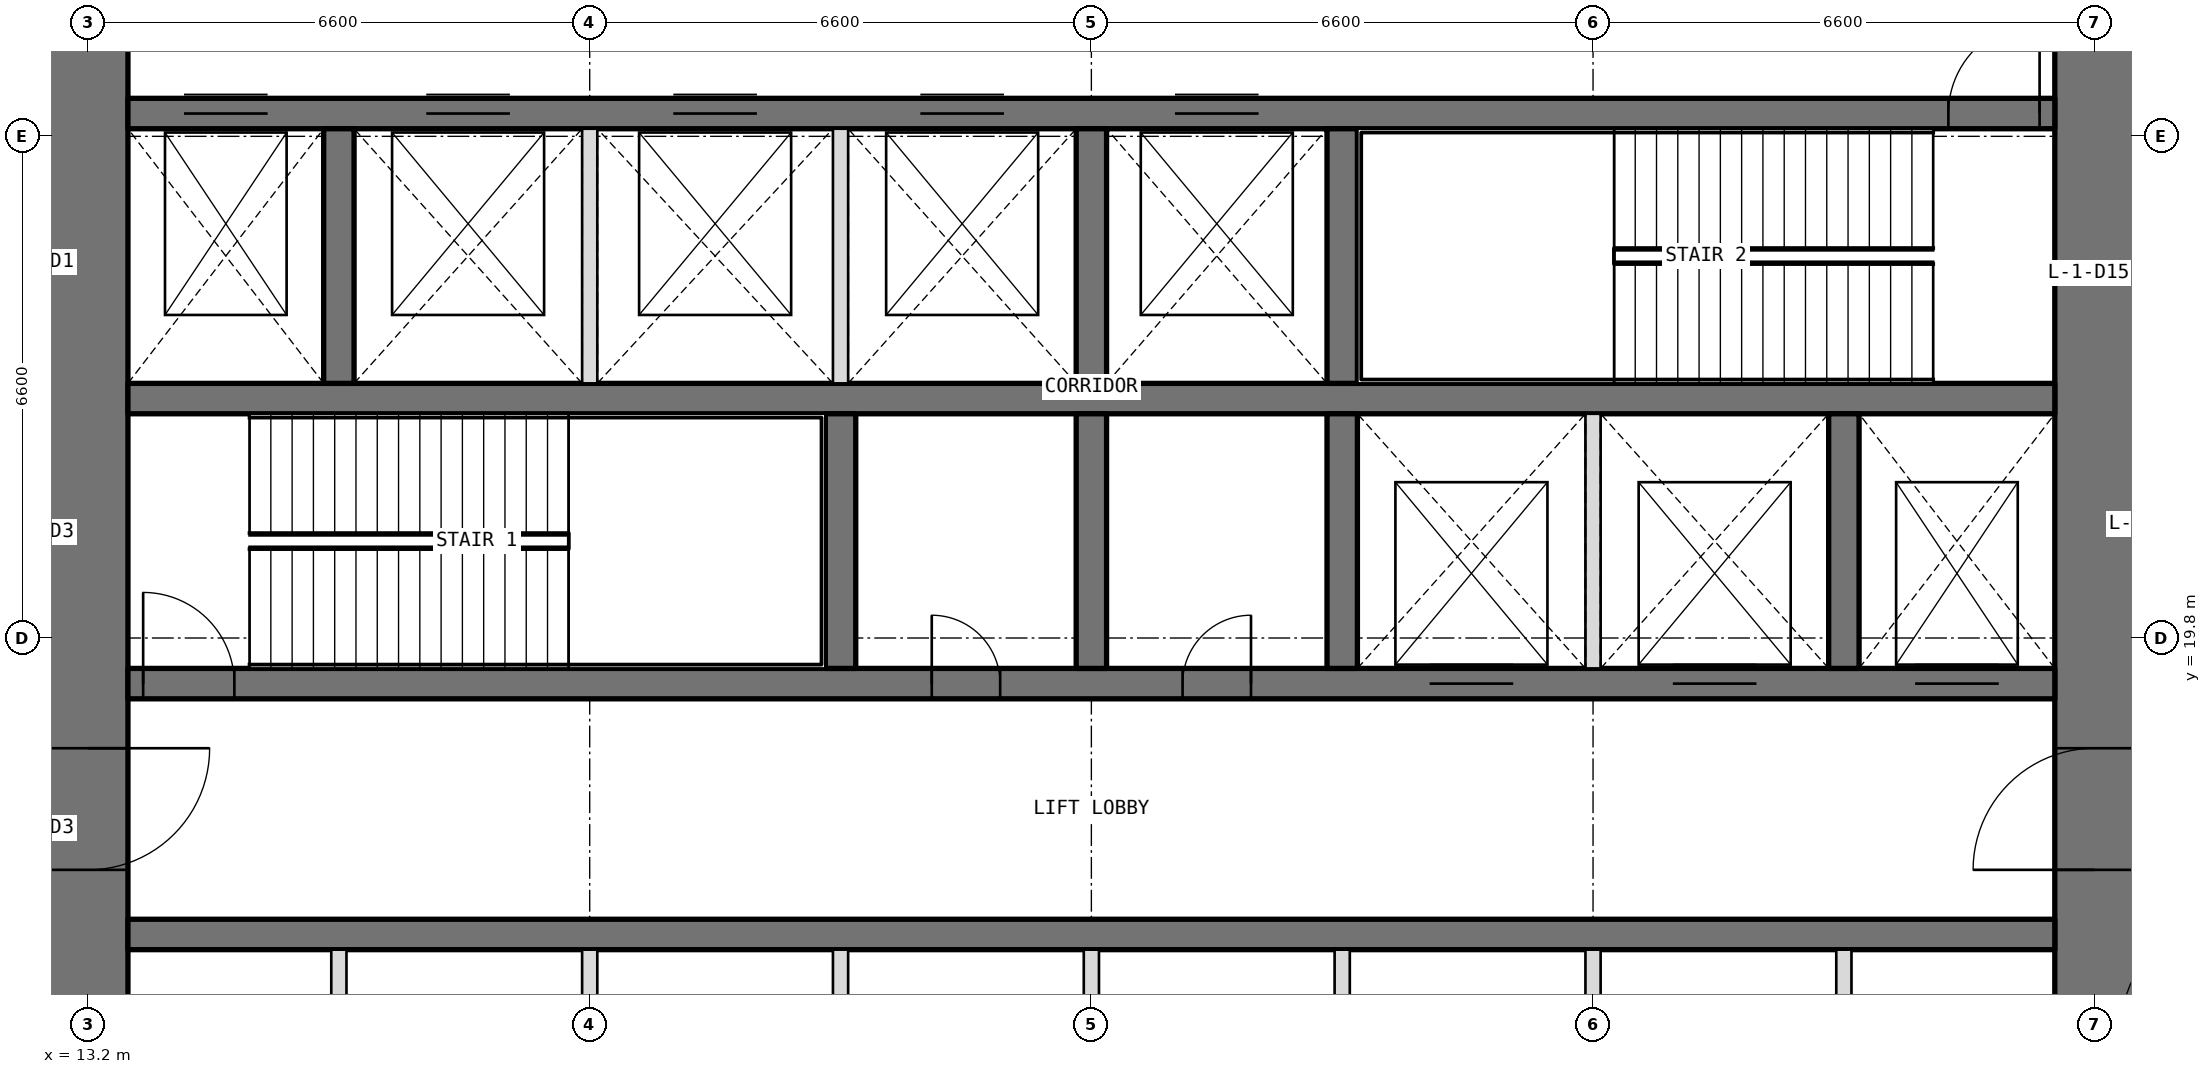
"""IFC4 building model, lengths in metres.
Left out: names, types, materials, properties, quantities, classifications, styles, units other than length and angle.
Written with IfcOpenShell. Run it as: python <this file> out.ifc"""

import sys

from ifc_helpers import new_model, si_unit, direction, frame, frame_2d, origin, place, context, subcontext, project, spatial, rectangle, extrude, element, fill, save


model = new_model("IFC4")
c1 = context("Model", 3, precision=1e-05, world=origin(), true_north=direction((0.0, 1.0)))
c2 = subcontext(c1, "Body", "Model", "MODEL_VIEW")
j1 = project(units=[si_unit("LENGTHUNIT", "METRE"), si_unit("PLANEANGLEUNIT", "RADIAN")], contexts=[c1])
p1 = place(None, origin())
s1 = spatial("IfcSite", under=j1, at=p1, CompositionType="ELEMENT")
p2 = place(p1, origin())
s2 = spatial("IfcBuilding", under=s1, at=p2, CompositionType="ELEMENT")
p3 = place(p2, frame((0.0, 0.0, -5.4)))
s3 = spatial("IfcBuildingStorey", under=s2, at=p3, CompositionType="ELEMENT", Elevation=-5.4)
p4 = place(p3, frame((39.6, 13.725, -0.15), z_axis=(0.0, 0.0, 1.0), x_axis=(0.0, 1.0, 0.0)))
e1 = element("IfcWall", 1, at=p4, inside=s3, PredefinedType="SHEAR", context=c2, shape_type="SweptSolid", body=[
    extrude(rectangle(XDim=18.75, YDim=1.05, at=frame_2d((9.375, 0.0))), origin(), (0.0, 0.0, 1.0), 5.55),
])
p5 = place(p4, frame((3.025, 0.0, 0.15)))
e2 = element("IfcOpeningElement", 2, at=p5, cuts=e1, PredefinedType="OPENING", context=c2, shape_type="SweptSolid", body=[
    extrude(rectangle(XDim=1.6, YDim=2.1, at=frame_2d((0.8, 1.05))), frame((0.0, 0.535, 0.0), z_axis=(0.0, -1.0, 0.0), x_axis=(1.0, 0.0, 0.0)), (0.0, 0.0, 1.0), 1.07),
])
p6 = place(p4, frame((13.825, 0.0, 0.15)))
e3 = element("IfcOpeningElement", 3, at=p6, cuts=e1, PredefinedType="OPENING", context=c2, shape_type="SweptSolid", body=[
    extrude(rectangle(XDim=1.6, YDim=2.1, at=frame_2d((0.8, 1.05))), frame((0.0, 0.535, 0.0), z_axis=(0.0, -1.0, 0.0), x_axis=(1.0, 0.0, 0.0)), (0.0, 0.0, 1.0), 1.07),
])
p7 = place(p3, frame((13.2, 32.475, -0.15), z_axis=(0.0, 0.0, 1.0), x_axis=(0.0, -1.0, 0.0)))
e4 = element("IfcWall", 4, at=p7, inside=s3, PredefinedType="SHEAR", context=c2, shape_type="SweptSolid", body=[
    extrude(rectangle(XDim=18.75, YDim=1.05, at=frame_2d((9.375, 0.0))), origin(), (0.0, 0.0, 1.0), 5.55),
])
p8 = place(p7, frame((14.125, 0.0, 0.15)))
e5 = element("IfcOpeningElement", 5, at=p8, cuts=e4, PredefinedType="OPENING", context=c2, shape_type="SweptSolid", body=[
    extrude(rectangle(XDim=1.6, YDim=2.1, at=frame_2d((0.8, 1.05))), frame((0.0, 0.535, 0.0), z_axis=(0.0, -1.0, 0.0), x_axis=(1.0, 0.0, 0.0)), (0.0, 0.0, 1.0), 1.07),
])
p9 = place(p7, frame((3.325, 0.0, 0.15)))
e6 = element("IfcOpeningElement", 6, at=p9, cuts=e4, PredefinedType="OPENING", context=c2, shape_type="SweptSolid", body=[
    extrude(rectangle(XDim=1.6, YDim=2.1, at=frame_2d((0.8, 1.05))), frame((0.0, 0.535, 0.0), z_axis=(0.0, -1.0, 0.0), x_axis=(1.0, 0.0, 0.0)), (0.0, 0.0, 1.0), 1.07),
])
p10 = place(p3, frame((13.725, 15.9, -0.15), z_axis=(0.0, 0.0, 1.0), x_axis=(1.0, 0.0, 0.0)))
e7 = element("IfcWall", 7, at=p10, inside=s3, PredefinedType="SHEAR", context=c2, shape_type="SweptSolid", body=[
    extrude(rectangle(XDim=25.35, YDim=0.4, at=frame_2d((12.675, 0.0))), origin(), (0.0, 0.0, 1.0), 5.55),
])
p11 = place(p3, frame((13.725, 19.2, -0.15), z_axis=(0.0, 0.0, 1.0), x_axis=(1.0, 0.0, 0.0)))
e8 = element("IfcWall", 8, at=p11, inside=s3, PredefinedType="SHEAR", context=c2, shape_type="SweptSolid", body=[
    extrude(rectangle(XDim=25.35, YDim=0.4, at=frame_2d((12.675, 0.0))), origin(), (0.0, 0.0, 1.0), 5.55),
])
p12 = place(p11, frame((10.575, 0.0, 0.15)))
e9 = element("IfcOpeningElement", 9, at=p12, cuts=e8, PredefinedType="OPENING", context=c2, shape_type="SweptSolid", body=[
    extrude(rectangle(XDim=0.9, YDim=2.1, at=frame_2d((0.45, 1.05))), frame((0.0, 0.21, 0.0), z_axis=(0.0, -1.0, 0.0), x_axis=(1.0, 0.0, 0.0)), (0.0, 0.0, 1.0), 0.42),
])
p13 = place(p11, frame((13.875, 0.0, 0.15)))
e10 = element("IfcOpeningElement", 10, at=p13, cuts=e8, PredefinedType="OPENING", context=c2, shape_type="SweptSolid", body=[
    extrude(rectangle(XDim=0.9, YDim=2.1, at=frame_2d((0.45, 1.05))), frame((0.0, 0.21, 0.0), z_axis=(0.0, -1.0, 0.0), x_axis=(1.0, 0.0, 0.0)), (0.0, 0.0, 1.0), 0.42),
])
p14 = place(p11, frame((0.2, 0.0, 0.15)))
e11 = element("IfcOpeningElement", 11, at=p14, cuts=e8, PredefinedType="OPENING", context=c2, shape_type="SweptSolid", body=[
    extrude(rectangle(XDim=1.2, YDim=2.1, at=frame_2d((0.6, 1.05))), frame((0.0, 0.21, 0.0), z_axis=(0.0, -1.0, 0.0), x_axis=(1.0, 0.0, 0.0)), (0.0, 0.0, 1.0), 0.42),
])
p15 = place(p11, frame((23.512, 0.0, 0.15)))
e12 = element("IfcOpeningElement", 12, at=p15, cuts=e8, PredefinedType="OPENING", context=c2, shape_type="SweptSolid", body=[
    extrude(rectangle(XDim=1.1, YDim=2.1, at=frame_2d((0.55, 1.05))), frame((0.0, 0.21, 0.0), z_axis=(0.0, -1.0, 0.0), x_axis=(1.0, 0.0, 0.0)), (0.0, 0.0, 1.0), 0.42),
])
p16 = place(p11, frame((17.125, 0.0, 0.15)))
e13 = element("IfcOpeningElement", 13, at=p16, cuts=e8, PredefinedType="OPENING", context=c2, shape_type="SweptSolid", body=[
    extrude(rectangle(XDim=1.1, YDim=2.1, at=frame_2d((0.55, 1.05))), frame((0.0, 0.21, 0.0), z_axis=(0.0, -1.0, 0.0), x_axis=(1.0, 0.0, 0.0)), (0.0, 0.0, 1.0), 0.42),
])
p17 = place(p11, frame((20.325, 0.0, 0.15)))
e14 = element("IfcOpeningElement", 14, at=p17, cuts=e8, PredefinedType="OPENING", context=c2, shape_type="SweptSolid", body=[
    extrude(rectangle(XDim=1.1, YDim=2.1, at=frame_2d((0.55, 1.05))), frame((0.0, 0.21, 0.0), z_axis=(0.0, -1.0, 0.0), x_axis=(1.0, 0.0, 0.0)), (0.0, 0.0, 1.0), 0.42),
])
p18 = place(p3, frame((13.725, 22.95, -0.15), z_axis=(0.0, 0.0, 1.0), x_axis=(1.0, 0.0, 0.0)))
e15 = element("IfcWall", 15, at=p18, inside=s3, PredefinedType="SHEAR", context=c2, shape_type="SweptSolid", body=[
    extrude(rectangle(XDim=25.35, YDim=0.4, at=frame_2d((12.675, 0.0))), origin(), (0.0, 0.0, 1.0), 5.55),
])
p19 = place(p3, frame((13.725, 26.7, -0.15), z_axis=(0.0, 0.0, 1.0), x_axis=(1.0, 0.0, 0.0)))
e16 = element("IfcWall", 16, at=p19, inside=s3, PredefinedType="SHEAR", context=c2, shape_type="SweptSolid", body=[
    extrude(rectangle(XDim=25.35, YDim=0.4, at=frame_2d((12.675, 0.0))), origin(), (0.0, 0.0, 1.0), 5.55),
])
p20 = place(p19, frame((23.95, 0.0, 0.15)))
e17 = element("IfcOpeningElement", 17, at=p20, cuts=e16, PredefinedType="OPENING", context=c2, shape_type="SweptSolid", body=[
    extrude(rectangle(XDim=1.2, YDim=2.1, at=frame_2d((0.6, 1.05))), frame((0.0, 0.21, 0.0), z_axis=(0.0, -1.0, 0.0), x_axis=(1.0, 0.0, 0.0)), (0.0, 0.0, 1.0), 0.42),
])
p21 = place(p19, frame((0.738, 0.0, 0.15)))
e18 = element("IfcOpeningElement", 18, at=p21, cuts=e16, PredefinedType="OPENING", context=c2, shape_type="SweptSolid", body=[
    extrude(rectangle(XDim=1.1, YDim=2.1, at=frame_2d((0.55, 1.05))), frame((0.0, 0.21, 0.0), z_axis=(0.0, -1.0, 0.0), x_axis=(1.0, 0.0, 0.0)), (0.0, 0.0, 1.0), 0.42),
])
p22 = place(p19, frame((3.925, 0.0, 0.15)))
e19 = element("IfcOpeningElement", 19, at=p22, cuts=e16, PredefinedType="OPENING", context=c2, shape_type="SweptSolid", body=[
    extrude(rectangle(XDim=1.1, YDim=2.1, at=frame_2d((0.55, 1.05))), frame((0.0, 0.21, 0.0), z_axis=(0.0, -1.0, 0.0), x_axis=(1.0, 0.0, 0.0)), (0.0, 0.0, 1.0), 0.42),
])
p23 = place(p19, frame((7.175, 0.0, 0.15)))
e20 = element("IfcOpeningElement", 20, at=p23, cuts=e16, PredefinedType="OPENING", context=c2, shape_type="SweptSolid", body=[
    extrude(rectangle(XDim=1.1, YDim=2.1, at=frame_2d((0.55, 1.05))), frame((0.0, 0.21, 0.0), z_axis=(0.0, -1.0, 0.0), x_axis=(1.0, 0.0, 0.0)), (0.0, 0.0, 1.0), 0.42),
])
p24 = place(p19, frame((10.425, 0.0, 0.15)))
e21 = element("IfcOpeningElement", 21, at=p24, cuts=e16, PredefinedType="OPENING", context=c2, shape_type="SweptSolid", body=[
    extrude(rectangle(XDim=1.1, YDim=2.1, at=frame_2d((0.55, 1.05))), frame((0.0, 0.21, 0.0), z_axis=(0.0, -1.0, 0.0), x_axis=(1.0, 0.0, 0.0)), (0.0, 0.0, 1.0), 0.42),
])
p25 = place(p19, frame((13.775, 0.0, 0.15)))
e22 = element("IfcOpeningElement", 22, at=p25, cuts=e16, PredefinedType="OPENING", context=c2, shape_type="SweptSolid", body=[
    extrude(rectangle(XDim=1.1, YDim=2.1, at=frame_2d((0.55, 1.05))), frame((0.0, 0.21, 0.0), z_axis=(0.0, -1.0, 0.0), x_axis=(1.0, 0.0, 0.0)), (0.0, 0.0, 1.0), 0.42),
])
for number, where, z_axis, x_axis in (
    (23, (23.1, 19.4, -0.15), (0.0, 0.0, 1.0), (0.0, 1.0, 0.0)),
    (24, (26.4, 19.4, -0.15), (0.0, 0.0, 1.0), (0.0, 1.0, 0.0)),
    (25, (29.7, 19.4, -0.15), (0.0, 0.0, 1.0), (0.0, 1.0, 0.0)),
    (26, (36.3, 19.4, -0.15), (0.0, 0.0, 1.0), (0.0, 1.0, 0.0)),
    (27, (16.5, 23.15, -0.15), (0.0, 0.0, 1.0), (0.0, 1.0, 0.0)),
    (28, (26.4, 23.15, -0.15), (0.0, 0.0, 1.0), (0.0, 1.0, 0.0)),
    (29, (29.7, 23.15, -0.15), (0.0, 0.0, 1.0), (0.0, 1.0, 0.0)),
):
    element("IfcWall", number, at=place(p3, frame(where, z_axis=z_axis, x_axis=x_axis)), inside=s3, PredefinedType="SHEAR", context=c2, shape_type="SweptSolid", body=[
        extrude(rectangle(XDim=3.35, YDim=0.4, at=frame_2d((1.675, 0.0))), origin(), (0.0, 0.0, 1.0), 5.55),
    ])
for number, where, z_axis, x_axis in (
    (30, (16.5, 13.725, -0.15), (0.0, 0.0, 1.0), (0.0, 1.0, 0.0)),
    (31, (19.8, 13.725, -0.15), (0.0, 0.0, 1.0), (0.0, 1.0, 0.0)),
    (32, (23.1, 13.725, -0.15), (0.0, 0.0, 1.0), (0.0, 1.0, 0.0)),
    (33, (26.4, 13.725, -0.15), (0.0, 0.0, 1.0), (0.0, 1.0, 0.0)),
    (34, (29.7, 13.725, -0.15), (0.0, 0.0, 1.0), (0.0, 1.0, 0.0)),
    (35, (33.0, 13.725, -0.15), (0.0, 0.0, 1.0), (0.0, 1.0, 0.0)),
    (36, (36.3, 13.725, -0.15), (0.0, 0.0, 1.0), (0.0, 1.0, 0.0)),
):
    element("IfcWall", number, at=place(p3, frame(where, z_axis=z_axis, x_axis=x_axis)), inside=s3, PredefinedType="PARTITIONING", context=c2, shape_type="SweptSolid", body=[
        extrude(rectangle(XDim=1.975, YDim=0.2, at=frame_2d((0.987, 0.0))), origin(), (0.0, 0.0, 1.0), 5.55),
    ])
for number, where, z_axis, x_axis in (
    (37, (33.0, 19.4, -0.15), (0.0, 0.0, 1.0), (0.0, 1.0, 0.0)),
    (38, (19.8, 23.15, -0.15), (0.0, 0.0, 1.0), (0.0, 1.0, 0.0)),
    (39, (23.1, 23.15, -0.15), (0.0, 0.0, 1.0), (0.0, 1.0, 0.0)),
):
    element("IfcWall", number, at=place(p3, frame(where, z_axis=z_axis, x_axis=x_axis)), inside=s3, PredefinedType="PARTITIONING", context=c2, shape_type="SweptSolid", body=[
        extrude(rectangle(XDim=3.35, YDim=0.2, at=frame_2d((1.675, 0.0))), origin(), (0.0, 0.0, 1.0), 5.55),
    ])
p26 = place(p12, origin())
e40 = element("IfcDoor", 40, at=p26, inside=s3, OperationType="SINGLE_SWING_LEFT", PredefinedType="DOOR", context=c2, shape_type="SweptSolid", body=[
    extrude(rectangle(XDim=0.9, YDim=2.1, at=frame_2d((0.45, 1.05))), frame((0.0, 0.025, 0.0), z_axis=(0.0, -1.0, 0.0), x_axis=(1.0, 0.0, 0.0)), (0.0, 0.0, 1.0), 0.05),
])
fill(e9, e40)
p27 = place(p13, origin())
e41 = element("IfcDoor", 41, at=p27, inside=s3, OperationType="SINGLE_SWING_RIGHT", PredefinedType="DOOR", context=c2, shape_type="SweptSolid", body=[
    extrude(rectangle(XDim=0.9, YDim=2.1, at=frame_2d((0.45, 1.05))), frame((0.0, 0.025, 0.0), z_axis=(0.0, -1.0, 0.0), x_axis=(1.0, 0.0, 0.0)), (0.0, 0.0, 1.0), 0.05),
])
fill(e10, e41)
p28 = place(p14, origin())
e42 = element("IfcDoor", 42, at=p28, inside=s3, OperationType="SINGLE_SWING_LEFT", PredefinedType="DOOR", context=c2, shape_type="SweptSolid", body=[
    extrude(rectangle(XDim=1.2, YDim=2.1, at=frame_2d((0.6, 1.05))), frame((0.0, 0.025, 0.0), z_axis=(0.0, -1.0, 0.0), x_axis=(1.0, 0.0, 0.0)), (0.0, 0.0, 1.0), 0.05),
])
fill(e11, e42)
p29 = place(p20, origin())
e43 = element("IfcDoor", 43, at=p29, inside=s3, OperationType="SINGLE_SWING_RIGHT", PredefinedType="DOOR", context=c2, shape_type="SweptSolid", body=[
    extrude(rectangle(XDim=1.2, YDim=2.1, at=frame_2d((0.6, 1.05))), frame((0.0, 0.025, 0.0), z_axis=(0.0, -1.0, 0.0), x_axis=(1.0, 0.0, 0.0)), (0.0, 0.0, 1.0), 0.05),
])
fill(e17, e43)
p30 = place(p8, origin())
e44 = element("IfcDoor", 44, at=p30, inside=s3, OperationType="DOUBLE_DOOR_DOUBLE_SWING", PredefinedType="DOOR", context=c2, shape_type="SweptSolid", body=[
    extrude(rectangle(XDim=1.6, YDim=2.1, at=frame_2d((0.8, 1.05))), frame((0.0, 0.025, 0.0), z_axis=(0.0, -1.0, 0.0), x_axis=(1.0, 0.0, 0.0)), (0.0, 0.0, 1.0), 0.05),
])
fill(e5, e44)
p31 = place(p5, origin())
e45 = element("IfcDoor", 45, at=p31, inside=s3, OperationType="DOUBLE_DOOR_DOUBLE_SWING", PredefinedType="DOOR", context=c2, shape_type="SweptSolid", body=[
    extrude(rectangle(XDim=1.6, YDim=2.1, at=frame_2d((0.8, 1.05))), frame((0.0, 0.025, 0.0), z_axis=(0.0, -1.0, 0.0), x_axis=(1.0, 0.0, 0.0)), (0.0, 0.0, 1.0), 0.05),
])
fill(e2, e45)
p32 = place(p21, origin())
e46 = element("IfcDoor", 46, at=p32, inside=s3, OperationType="DOUBLE_DOOR_SLIDING", PredefinedType="DOOR", context=c2, shape_type="SweptSolid", body=[
    extrude(rectangle(XDim=1.1, YDim=2.1, at=frame_2d((0.55, 1.05))), frame((0.0, 0.025, 0.0), z_axis=(0.0, -1.0, 0.0), x_axis=(1.0, 0.0, 0.0)), (0.0, 0.0, 1.0), 0.05),
])
fill(e18, e46)
p33 = place(p15, origin())
e47 = element("IfcDoor", 47, at=p33, inside=s3, OperationType="DOUBLE_DOOR_SLIDING", PredefinedType="DOOR", context=c2, shape_type="SweptSolid", body=[
    extrude(rectangle(XDim=1.1, YDim=2.1, at=frame_2d((0.55, 1.05))), frame((0.0, 0.025, 0.0), z_axis=(0.0, -1.0, 0.0), x_axis=(1.0, 0.0, 0.0)), (0.0, 0.0, 1.0), 0.05),
])
fill(e12, e47)
p34 = place(p16, origin())
e48 = element("IfcDoor", 48, at=p34, inside=s3, OperationType="DOUBLE_DOOR_SLIDING", PredefinedType="DOOR", context=c2, shape_type="SweptSolid", body=[
    extrude(rectangle(XDim=1.1, YDim=2.1, at=frame_2d((0.55, 1.05))), frame((0.0, 0.025, 0.0), z_axis=(0.0, -1.0, 0.0), x_axis=(1.0, 0.0, 0.0)), (0.0, 0.0, 1.0), 0.05),
])
fill(e13, e48)
p35 = place(p17, origin())
e49 = element("IfcDoor", 49, at=p35, inside=s3, OperationType="DOUBLE_DOOR_SLIDING", PredefinedType="DOOR", context=c2, shape_type="SweptSolid", body=[
    extrude(rectangle(XDim=1.1, YDim=2.1, at=frame_2d((0.55, 1.05))), frame((0.0, 0.025, 0.0), z_axis=(0.0, -1.0, 0.0), x_axis=(1.0, 0.0, 0.0)), (0.0, 0.0, 1.0), 0.05),
])
fill(e14, e49)
p36 = place(p22, origin())
e50 = element("IfcDoor", 50, at=p36, inside=s3, OperationType="DOUBLE_DOOR_SLIDING", PredefinedType="DOOR", context=c2, shape_type="SweptSolid", body=[
    extrude(rectangle(XDim=1.1, YDim=2.1, at=frame_2d((0.55, 1.05))), frame((0.0, 0.025, 0.0), z_axis=(0.0, -1.0, 0.0), x_axis=(1.0, 0.0, 0.0)), (0.0, 0.0, 1.0), 0.05),
])
fill(e19, e50)
p37 = place(p23, origin())
e51 = element("IfcDoor", 51, at=p37, inside=s3, OperationType="DOUBLE_DOOR_SLIDING", PredefinedType="DOOR", context=c2, shape_type="SweptSolid", body=[
    extrude(rectangle(XDim=1.1, YDim=2.1, at=frame_2d((0.55, 1.05))), frame((0.0, 0.025, 0.0), z_axis=(0.0, -1.0, 0.0), x_axis=(1.0, 0.0, 0.0)), (0.0, 0.0, 1.0), 0.05),
])
fill(e20, e51)
p38 = place(p24, origin())
e52 = element("IfcDoor", 52, at=p38, inside=s3, OperationType="DOUBLE_DOOR_SLIDING", PredefinedType="DOOR", context=c2, shape_type="SweptSolid", body=[
    extrude(rectangle(XDim=1.1, YDim=2.1, at=frame_2d((0.55, 1.05))), frame((0.0, 0.025, 0.0), z_axis=(0.0, -1.0, 0.0), x_axis=(1.0, 0.0, 0.0)), (0.0, 0.0, 1.0), 0.05),
])
fill(e21, e52)
p39 = place(p25, origin())
e53 = element("IfcDoor", 53, at=p39, inside=s3, OperationType="DOUBLE_DOOR_SLIDING", PredefinedType="DOOR", context=c2, shape_type="SweptSolid", body=[
    extrude(rectangle(XDim=1.1, YDim=2.1, at=frame_2d((0.55, 1.05))), frame((0.0, 0.025, 0.0), z_axis=(0.0, -1.0, 0.0), x_axis=(1.0, 0.0, 0.0)), (0.0, 0.0, 1.0), 0.05),
])
fill(e22, e53)
save(model, sys.argv[1])
